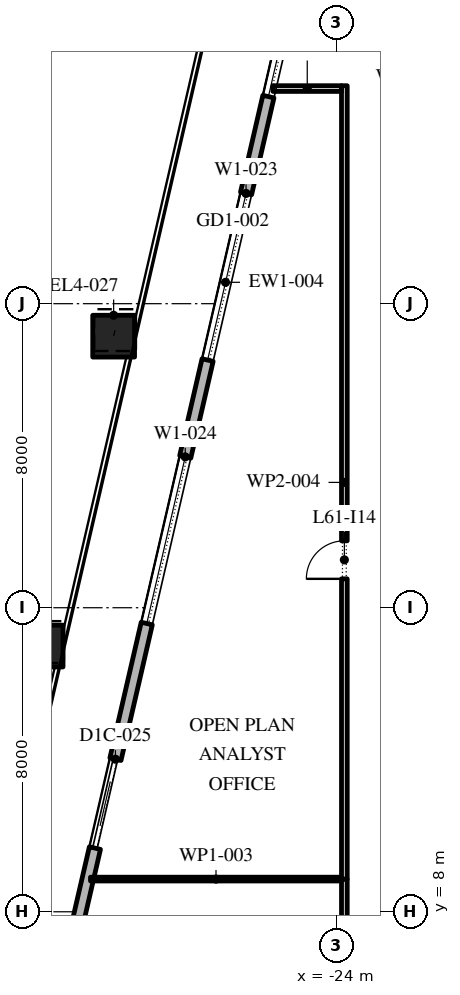
"""IFC4 building model, lengths in metres.
Left out: names, types, materials, properties, quantities, classifications, styles, units other than length and angle.
Written with IfcOpenShell. Run it as: python <this file> out.ifc"""

import sys

from ifc_helpers import new_model, si_unit, direction, frame, frame_2d, origin, origin_2d, place, context, subcontext, project, spatial, rectangle, extrude, element, fill, save


model = new_model("IFC4")
c1 = context("Model", 3, precision=1e-05, world=origin(), true_north=direction((0.0, 1.0)))
c2 = subcontext(c1, "Body", "Model", "MODEL_VIEW")
j1 = project(units=[si_unit("LENGTHUNIT", "METRE"), si_unit("PLANEANGLEUNIT", "RADIAN")], contexts=[c1])
p1 = place(None, origin())
s1 = spatial("IfcSite", under=j1, at=p1, CompositionType="ELEMENT")
p2 = place(p1, origin())
s2 = spatial("IfcBuilding", under=s1, at=p2, CompositionType="ELEMENT")
p3 = place(p2, frame((0.0, 0.0, 280.8)))
s3 = spatial("IfcBuildingStorey", under=s2, at=p3, CompositionType="ELEMENT", Elevation=280.8)
p4 = place(p3, frame((-29.871, 23.145, 0.0), z_axis=(0.00871280379, 0.037929739166, 0.999242424008), x_axis=(-0.974617095667, 0.223878352757, 0.0)))
e1 = element("IfcColumn", 1, at=p4, inside=s3, PredefinedType="COLUMN", context=c2, shape_type="SweptSolid", body=[
    extrude(rectangle(XDim=1.1, YDim=1.1, at=origin_2d()), origin(), (0.0, 0.0, 1.0), 4.203),
])
p5 = place(p3, frame((-31.753, 14.99, 0.0), z_axis=(0.005869083212, 0.025335844359, 0.999661767226), x_axis=(-0.974202561131, 0.225675363932, 0.0)))
e2 = element("IfcColumn", 2, at=p5, inside=s3, PredefinedType="COLUMN", context=c2, shape_type="SweptSolid", body=[
    extrude(rectangle(XDim=1.1, YDim=1.1, at=origin_2d()), origin(), (0.0, 0.0, 1.0), 4.201),
])
p6 = place(p3, frame((-21.359, 48.678, 0.0), z_axis=(0.0, 0.0, 1.0), x_axis=(-0.224949198343, -0.974370493275, 0.0)))
e3 = element("IfcWall", 3, at=p6, inside=s3, PredefinedType="STANDARD", context=c2, shape_type="SweptSolid", body=[
    extrude(rectangle(XDim=49.5, YDim=0.3, at=frame_2d((24.75, 0.0))), origin(), (0.0, 0.0, 1.0), 4.0),
])
p7 = place(p6, frame((1.157, 0.0, 0.45)))
e4 = element("IfcOpeningElement", 4, at=p7, cuts=e3, PredefinedType="OPENING", context=c2, shape_type="SweptSolid", body=[
    extrude(rectangle(XDim=4.5, YDim=3.05, at=frame_2d((2.25, 1.525))), frame((0.0, 0.16, 0.0), z_axis=(0.0, -1.0, 0.0), x_axis=(1.0, 0.0, 0.0)), (0.0, 0.0, 1.0), 0.32),
])
p8 = place(p6, frame((9.171, 0.0, 0.0)))
e5 = element("IfcOpeningElement", 5, at=p8, cuts=e3, PredefinedType="OPENING", context=c2, shape_type="SweptSolid", body=[
    extrude(rectangle(XDim=2.4, YDim=3.5, at=frame_2d((1.2, 1.75))), frame((0.0, 0.16, 0.0), z_axis=(0.0, -1.0, 0.0), x_axis=(1.0, 0.0, 0.0)), (0.0, 0.0, 1.0), 0.32),
])
p9 = place(p6, frame((15.236, 0.0, 0.45)))
e6 = element("IfcOpeningElement", 6, at=p9, cuts=e3, PredefinedType="OPENING", context=c2, shape_type="SweptSolid", body=[
    extrude(rectangle(XDim=4.5, YDim=3.05, at=frame_2d((2.25, 1.525))), frame((0.0, 0.16, 0.0), z_axis=(0.0, -1.0, 0.0), x_axis=(1.0, 0.0, 0.0)), (0.0, 0.0, 1.0), 0.32),
])
p10 = place(p6, frame((22.35, 0.0, 0.45)))
e7 = element("IfcOpeningElement", 7, at=p10, cuts=e3, PredefinedType="OPENING", context=c2, shape_type="SweptSolid", body=[
    extrude(rectangle(XDim=4.5, YDim=3.05, at=frame_2d((2.25, 1.525))), frame((0.0, 0.16, 0.0), z_axis=(0.0, -1.0, 0.0), x_axis=(1.0, 0.0, 0.0)), (0.0, 0.0, 1.0), 0.32),
])
p11 = place(p6, frame((29.464, 0.0, 0.45)))
e8 = element("IfcOpeningElement", 8, at=p11, cuts=e3, PredefinedType="OPENING", context=c2, shape_type="SweptSolid", body=[
    extrude(rectangle(XDim=4.5, YDim=3.05, at=frame_2d((2.25, 1.525))), frame((0.0, 0.16, 0.0), z_axis=(0.0, -1.0, 0.0), x_axis=(1.0, 0.0, 0.0)), (0.0, 0.0, 1.0), 0.32),
])
p12 = place(p6, frame((37.628, 0.0, 0.0)))
e9 = element("IfcOpeningElement", 9, at=p12, cuts=e3, PredefinedType="OPENING", context=c2, shape_type="SweptSolid", body=[
    extrude(rectangle(XDim=2.4, YDim=3.325, at=frame_2d((1.2, 1.663))), frame((0.0, 0.16, 0.0), z_axis=(0.0, -1.0, 0.0), x_axis=(1.0, 0.0, 0.0)), (0.0, 0.0, 1.0), 0.32),
])
p13 = place(p6, frame((43.693, 0.0, 0.45)))
e10 = element("IfcOpeningElement", 10, at=p13, cuts=e3, PredefinedType="OPENING", context=c2, shape_type="SweptSolid", body=[
    extrude(rectangle(XDim=4.5, YDim=2.825, at=frame_2d((2.25, 1.413))), frame((0.0, 0.16, 0.0), z_axis=(0.0, -1.0, 0.0), x_axis=(1.0, 0.0, 0.0)), (0.0, 0.0, 1.0), 0.32),
])
p14 = place(p3, frame((-23.8, -4.4, 0.0), z_axis=(0.0, 0.0, 1.0), x_axis=(0.0, 1.0, 0.0)))
e11 = element("IfcWall", 11, at=p14, inside=s3, PredefinedType="PARTITIONING", context=c2, shape_type="SweptSolid", body=[
    extrude(rectangle(XDim=13.26, YDim=0.15, at=frame_2d((6.63, 0.0))), origin(), (0.0, 0.0, 1.0), 4.0),
])
p15 = place(p14, frame((7.36, 0.0, 0.0)))
e12 = element("IfcOpeningElement", 12, at=p15, cuts=e11, PredefinedType="OPENING", context=c2, shape_type="SweptSolid", body=[
    extrude(rectangle(XDim=1.0, YDim=2.1, at=frame_2d((0.5, 1.05))), frame((0.0, 0.085, 0.0), z_axis=(0.0, -1.0, 0.0), x_axis=(1.0, 0.0, 0.0)), (0.0, 0.0, 1.0), 0.17),
])
p16 = place(p3, frame((-23.875, 8.86, 0.0), z_axis=(0.0, 0.0, 1.0), x_axis=(-1.0, 0.0, 0.0)))
e13 = element("IfcWall", 13, at=p16, inside=s3, PredefinedType="PARTITIONING", context=c2, shape_type="SweptSolid", body=[
    extrude(rectangle(XDim=6.605, YDim=0.1, at=frame_2d((3.302, 0.0))), origin(), (0.0, 0.0, 1.0), 4.0),
])
p17 = place(p3, frame((-23.8, 8.86, 0.0), z_axis=(0.0, 0.0, 1.0), x_axis=(0.0, 1.0, 0.0)))
e14 = element("IfcWall", 14, at=p17, inside=s3, PredefinedType="PARTITIONING", context=c2, shape_type="SweptSolid", body=[
    extrude(rectangle(XDim=20.875, YDim=0.15, at=frame_2d((10.438, 0.0))), origin(), (0.0, 0.0, 1.0), 4.0),
])
p18 = place(p17, frame((7.9, 0.0, 0.0)))
e15 = element("IfcOpeningElement", 15, at=p18, cuts=e14, PredefinedType="OPENING", context=c2, shape_type="SweptSolid", body=[
    extrude(rectangle(XDim=1.0, YDim=2.1, at=frame_2d((0.5, 1.05))), frame((0.0, 0.085, 0.0), z_axis=(0.0, -1.0, 0.0), x_axis=(1.0, 0.0, 0.0)), (0.0, 0.0, 1.0), 0.17),
])
p19 = place(p3, frame((-23.875, 29.66, 0.0), z_axis=(0.0, 0.0, 1.0), x_axis=(-1.0, 0.0, 0.0)))
e16 = element("IfcWall", 16, at=p19, inside=s3, PredefinedType="PARTITIONING", context=c2, shape_type="SweptSolid", body=[
    extrude(rectangle(XDim=1.803, YDim=0.15, at=frame_2d((0.901, 0.0))), origin(), (0.0, 0.0, 1.0), 4.0),
])
p20 = place(p9, origin())
e17 = element("IfcWindow", 17, at=p20, inside=s3, PartitioningType="DOUBLE_PANEL_VERTICAL", PredefinedType="WINDOW", context=c2, shape_type="SweptSolid", body=[
    extrude(rectangle(XDim=4.5, YDim=3.05, at=frame_2d((2.25, 1.525))), frame((0.0, 0.03, 0.0), z_axis=(0.0, -1.0, 0.0), x_axis=(1.0, 0.0, 0.0)), (0.0, 0.0, 1.0), 0.06),
])
fill(e6, e17)
p21 = place(p10, origin())
e18 = element("IfcWindow", 18, at=p21, inside=s3, PartitioningType="DOUBLE_PANEL_VERTICAL", PredefinedType="WINDOW", context=c2, shape_type="SweptSolid", body=[
    extrude(rectangle(XDim=4.5, YDim=3.05, at=frame_2d((2.25, 1.525))), frame((0.0, 0.03, 0.0), z_axis=(0.0, -1.0, 0.0), x_axis=(1.0, 0.0, 0.0)), (0.0, 0.0, 1.0), 0.06),
])
fill(e7, e18)
p22 = place(p11, origin())
e19 = element("IfcWindow", 19, at=p22, inside=s3, PartitioningType="DOUBLE_PANEL_VERTICAL", PredefinedType="WINDOW", context=c2, shape_type="SweptSolid", body=[
    extrude(rectangle(XDim=4.5, YDim=3.05, at=frame_2d((2.25, 1.525))), frame((0.0, 0.03, 0.0), z_axis=(0.0, -1.0, 0.0), x_axis=(1.0, 0.0, 0.0)), (0.0, 0.0, 1.0), 0.06),
])
fill(e8, e19)
p23 = place(p12, origin())
e20 = element("IfcDoor", 20, at=p23, inside=s3, OperationType="DOUBLE_DOOR_SLIDING", PredefinedType="DOOR", context=c2, shape_type="SweptSolid", body=[
    extrude(rectangle(XDim=2.4, YDim=3.325, at=frame_2d((1.2, 1.663))), frame((0.0, 0.025, 0.0), z_axis=(0.0, -1.0, 0.0), x_axis=(1.0, 0.0, 0.0)), (0.0, 0.0, 1.0), 0.05),
])
fill(e9, e20)
p24 = place(p18, origin())
e21 = element("IfcDoor", 21, at=p24, inside=s3, OperationType="SINGLE_SWING_RIGHT", PredefinedType="DOOR", context=c2, shape_type="SweptSolid", body=[
    extrude(rectangle(XDim=1.0, YDim=2.1, at=frame_2d((0.5, 1.05))), frame((0.0, 0.025, 0.0), z_axis=(0.0, -1.0, 0.0), x_axis=(1.0, 0.0, 0.0)), (0.0, 0.0, 1.0), 0.05),
])
fill(e15, e21)
save(model, sys.argv[1])
